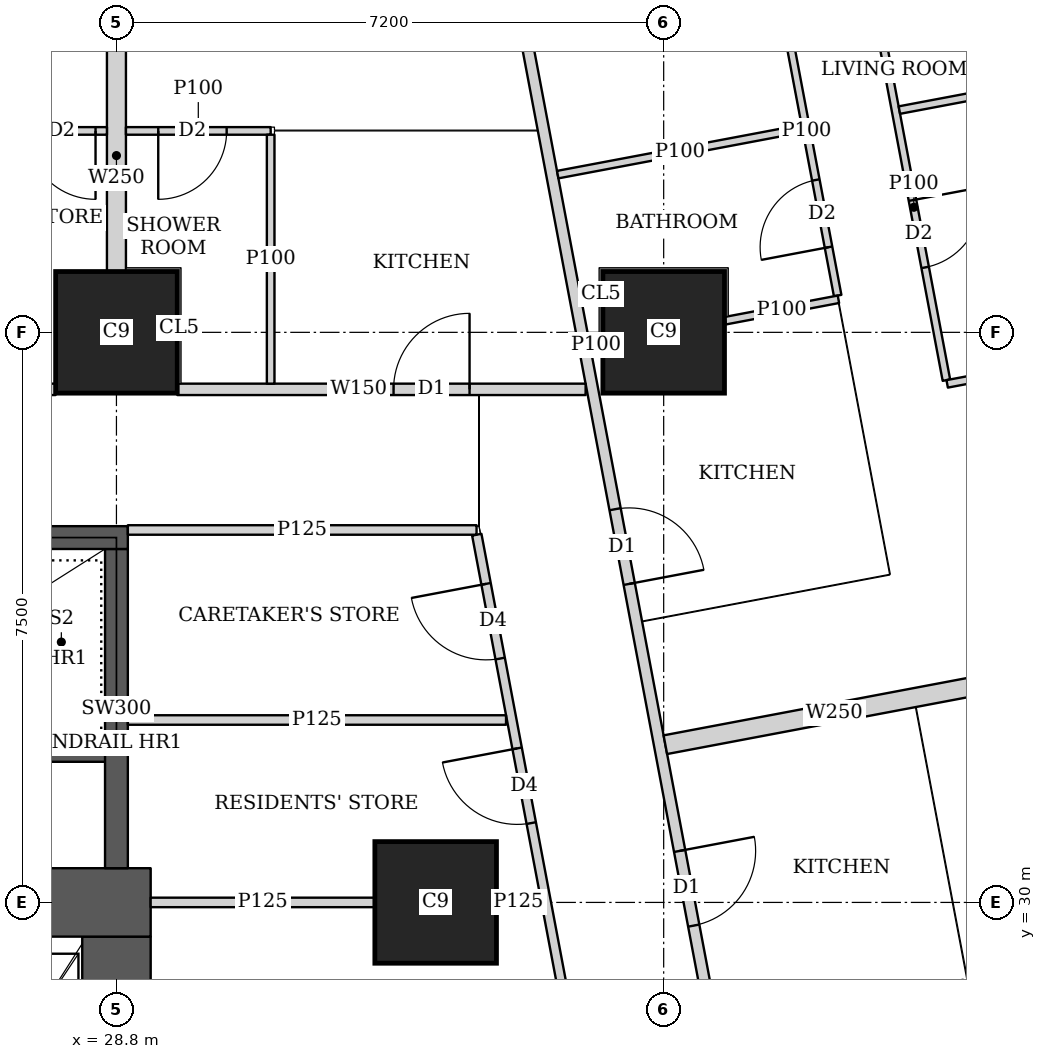
"""IFC4 building model, lengths in metres.
Left out: names, types, materials, properties, quantities, classifications, styles, units other than length and angle.
Written with IfcOpenShell. Run it as: python <this file> out.ifc"""

import sys

from ifc_helpers import new_model, si_unit, direction, frame, frame_2d, origin, origin_2d, place, context, subcontext, project, spatial, rectangle, extrude, element, fill, save


model = new_model("IFC4")
c1 = context("Model", 3, precision=1e-05, world=origin(), true_north=direction((0.0, 1.0)))
c2 = subcontext(c1, "Body", "Model", "MODEL_VIEW")
j1 = project(units=[si_unit("LENGTHUNIT", "METRE"), si_unit("PLANEANGLEUNIT", "RADIAN")], contexts=[c1])
p1 = place(None, origin())
s1 = spatial("IfcSite", under=j1, at=p1, CompositionType="ELEMENT")
p2 = place(p1, origin())
s2 = spatial("IfcBuilding", under=s1, at=p2, CompositionType="ELEMENT")
p3 = place(p2, frame((0.0, 0.0, 126.65)))
s3 = spatial("IfcBuildingStorey", under=s2, at=p3, CompositionType="ELEMENT", Elevation=126.65)
for number, where, z_axis, x_axis in (
    (1, (33.0, 30.0, 0.0), (0.0, 0.0, 1.0), (1.0, 0.0, 0.0)),
    (2, (28.8, 37.5, 0.0), (0.0, 0.0, 1.0), (1.0, 0.0, 0.0)),
    (3, (36.0, 37.5, 0.0), (0.0, 0.0, 1.0), (1.0, 0.0, 0.0)),
):
    element("IfcColumn", number, at=place(p3, frame(where, z_axis=z_axis, x_axis=x_axis)), inside=s3, PredefinedType="COLUMN", context=c2, shape_type="SweptSolid", body=[
        extrude(rectangle(XDim=1.6, YDim=1.6, at=origin_2d()), origin(), (0.0, 0.0, 1.0), 3.75),
    ])
p4 = place(p3, frame((13.95, 30.0, 0.0), z_axis=(0.0, 0.0, 1.0), x_axis=(1.0, 0.0, 0.0)))
e4 = element("IfcWall", 4, at=p4, inside=s3, PredefinedType="SHEAR", context=c2, shape_type="SweptSolid", body=[
    extrude(rectangle(XDim=15.3, YDim=0.9, at=frame_2d((7.65, 0.0))), origin(), (0.0, 0.0, 1.0), 3.75),
])
p5 = place(p4, frame((4.45, 0.0, 0.0)))
e5 = element("IfcOpeningElement", 5, at=p5, cuts=e4, PredefinedType="OPENING", context=c2, shape_type="SweptSolid", body=[
    extrude(rectangle(XDim=1.8, YDim=2.1, at=frame_2d((0.9, 1.05))), frame((0.0, 0.46, 0.0), z_axis=(0.0, -1.0, 0.0), x_axis=(1.0, 0.0, 0.0)), (0.0, 0.0, 1.0), 0.92),
])
p6 = place(p4, frame((10.7, 0.0, 0.0)))
e6 = element("IfcOpeningElement", 6, at=p6, cuts=e4, PredefinedType="OPENING", context=c2, shape_type="SweptSolid", body=[
    extrude(rectangle(XDim=1.1, YDim=2.1, at=frame_2d((0.55, 1.05))), frame((0.0, 0.46, 0.0), z_axis=(0.0, -1.0, 0.0), x_axis=(1.0, 0.0, 0.0)), (0.0, 0.0, 1.0), 0.92),
])
p7 = place(p3, frame((28.8, 15.45, 0.0), z_axis=(0.0, 0.0, 1.0), x_axis=(0.0, 1.0, 0.0)))
e7 = element("IfcWall", 7, at=p7, inside=s3, PredefinedType="SHEAR", context=c2, shape_type="SweptSolid", body=[
    extrude(rectangle(XDim=14.1, YDim=0.9, at=frame_2d((7.05, 0.0))), origin(), (0.0, 0.0, 1.0), 3.75),
])
p8 = place(p3, frame((21.45, 34.8, 0.0), z_axis=(0.0, 0.0, 1.0), x_axis=(1.0, 0.0, 0.0)))
e8 = element("IfcWall", 8, at=p8, inside=s3, PredefinedType="SHEAR", context=c2, shape_type="SweptSolid", body=[
    extrude(rectangle(XDim=7.5, YDim=0.3, at=frame_2d((3.75, 0.0))), origin(), (0.0, 0.0, 1.0), 3.75),
])
p9 = place(p8, frame((0.5, 0.0, 0.0)))
e9 = element("IfcOpeningElement", 9, at=p9, cuts=e8, PredefinedType="OPENING", context=c2, shape_type="SweptSolid", body=[
    extrude(rectangle(XDim=1.1, YDim=2.1, at=frame_2d((0.55, 1.05))), frame((0.0, 0.16, 0.0), z_axis=(0.0, -1.0, 0.0), x_axis=(1.0, 0.0, 0.0)), (0.0, 0.0, 1.0), 0.32),
])
p10 = place(p3, frame((28.8, 30.45, 0.0), z_axis=(0.0, 0.0, 1.0), x_axis=(0.0, 1.0, 0.0)))
e10 = element("IfcWall", 10, at=p10, inside=s3, PredefinedType="SHEAR", context=c2, shape_type="SweptSolid", body=[
    extrude(rectangle(XDim=4.2, YDim=0.3, at=frame_2d((2.1, 0.0))), origin(), (0.0, 0.0, 1.0), 3.75),
])
p11 = place(p3, frame((22.401, 36.75, 0.0), z_axis=(0.0, 0.0, 1.0), x_axis=(1.0, 0.0, 0.0)))
e11 = element("IfcWall", 11, at=p11, inside=s3, PredefinedType="SOLIDWALL", context=c2, shape_type="SweptSolid", body=[
    extrude(rectangle(XDim=5.598, YDim=0.15, at=frame_2d((2.799, 0.0))), origin(), (0.0, 0.0, 1.0), 3.45),
])
p12 = place(p11, frame((0.699, 0.0, 0.0)))
e12 = element("IfcOpeningElement", 12, at=p12, cuts=e11, PredefinedType="OPENING", context=c2, shape_type="SweptSolid", body=[
    extrude(rectangle(XDim=1.0, YDim=2.1, at=frame_2d((0.5, 1.05))), frame((0.0, 0.085, 0.0), z_axis=(0.0, -1.0, 0.0), x_axis=(1.0, 0.0, 0.0)), (0.0, 0.0, 1.0), 0.17),
])
p13 = place(p3, frame((29.601, 36.75, 0.0), z_axis=(0.0, 0.0, 1.0), x_axis=(1.0, 0.0, 0.0)))
e13 = element("IfcWall", 13, at=p13, inside=s3, PredefinedType="SOLIDWALL", context=c2, shape_type="SweptSolid", body=[
    extrude(rectangle(XDim=5.372, YDim=0.15, at=frame_2d((2.686, 0.0))), origin(), (0.0, 0.0, 1.0), 3.45),
])
p14 = place(p13, frame((2.845, 0.0, 0.0)))
e14 = element("IfcOpeningElement", 14, at=p14, cuts=e13, PredefinedType="OPENING", context=c2, shape_type="SweptSolid", body=[
    extrude(rectangle(XDim=1.0, YDim=2.1, at=frame_2d((0.5, 1.05))), frame((0.0, 0.085, 0.0), z_axis=(0.0, -1.0, 0.0), x_axis=(1.0, 0.0, 0.0)), (0.0, 0.0, 1.0), 0.17),
])
p15 = place(p3, frame((33.896, 42.929, 0.0), z_axis=(0.0, 0.0, 1.0), x_axis=(0.1855961604, -0.982626106535, 0.0)))
e15 = element("IfcWall", 15, at=p15, inside=s3, PredefinedType="SOLIDWALL", context=c2, shape_type="SweptSolid", body=[
    extrude(rectangle(XDim=41.456, YDim=0.15, at=frame_2d((20.728, 0.0))), origin(), (0.0, 0.0, 1.0), 2.45),
])
p16 = place(p15, frame((7.893, 0.0, 0.0)))
e16 = element("IfcOpeningElement", 16, at=p16, cuts=e15, PredefinedType="OPENING", context=c2, shape_type="SweptSolid", body=[
    extrude(rectangle(XDim=1.0, YDim=2.1, at=frame_2d((0.5, 1.05))), frame((0.0, 0.085, 0.0), z_axis=(0.0, -1.0, 0.0), x_axis=(1.0, 0.0, 0.0)), (0.0, 0.0, 1.0), 0.17),
])
p17 = place(p15, frame((12.468, 0.0, 0.0)))
e17 = element("IfcOpeningElement", 17, at=p17, cuts=e15, PredefinedType="OPENING", context=c2, shape_type="SweptSolid", body=[
    extrude(rectangle(XDim=1.0, YDim=2.1, at=frame_2d((0.5, 1.05))), frame((0.0, 0.085, 0.0), z_axis=(0.0, -1.0, 0.0), x_axis=(1.0, 0.0, 0.0)), (0.0, 0.0, 1.0), 0.17),
])
p18 = place(p15, frame((20.101, 0.0, 0.0)))
e18 = element("IfcOpeningElement", 18, at=p18, cuts=e15, PredefinedType="OPENING", context=c2, shape_type="SweptSolid", body=[
    extrude(rectangle(XDim=1.0, YDim=2.1, at=frame_2d((0.5, 1.05))), frame((0.0, 0.085, 0.0), z_axis=(0.0, -1.0, 0.0), x_axis=(1.0, 0.0, 0.0)), (0.0, 0.0, 1.0), 0.17),
])
p19 = place(p15, frame((31.064, 0.0, 0.0)))
e19 = element("IfcOpeningElement", 19, at=p19, cuts=e15, PredefinedType="OPENING", context=c2, shape_type="SweptSolid", body=[
    extrude(rectangle(XDim=1.0, YDim=2.1, at=frame_2d((0.5, 1.05))), frame((0.0, 0.085, 0.0), z_axis=(0.0, -1.0, 0.0), x_axis=(1.0, 0.0, 0.0)), (0.0, 0.0, 1.0), 0.17),
])
p20 = place(p3, frame((38.862, 41.42, 0.0), z_axis=(0.0, 0.0, 1.0), x_axis=(0.185332907641, -0.982675792592, 0.0)))
e20 = element("IfcWall", 20, at=p20, inside=s3, PredefinedType="PARTITIONING", context=c2, shape_type="SweptSolid", body=[
    extrude(rectangle(XDim=4.629, YDim=0.1, at=frame_2d((2.314, 0.0))), origin(), (0.0, 0.0, 1.0), 3.45),
])
p21 = place(p20, frame((2.22, 0.0, 0.0)))
e21 = element("IfcOpeningElement", 21, at=p21, cuts=e20, PredefinedType="OPENING", context=c2, shape_type="SweptSolid", body=[
    extrude(rectangle(XDim=0.9, YDim=2.1, at=frame_2d((0.45, 1.05))), frame((0.0, 0.06, 0.0), z_axis=(0.0, -1.0, 0.0), x_axis=(1.0, 0.0, 0.0)), (0.0, 0.0, 1.0), 0.12),
])
p22 = place(p3, frame((37.472, 42.309, 0.0), z_axis=(0.0, 0.0, 1.0), x_axis=(0.185641287362, -0.982617581985, 0.0)))
e22 = element("IfcWall", 22, at=p22, inside=s3, PredefinedType="PARTITIONING", context=c2, shape_type="SweptSolid", body=[
    extrude(rectangle(XDim=4.402, YDim=0.1, at=frame_2d((2.201, 0.0))), origin(), (0.0, 0.0, 1.0), 3.45),
])
p23 = place(p22, frame((2.854, 0.0, 0.0)))
e23 = element("IfcOpeningElement", 23, at=p23, cuts=e22, PredefinedType="OPENING", context=c2, shape_type="SweptSolid", body=[
    extrude(rectangle(XDim=0.9, YDim=2.1, at=frame_2d((0.45, 1.05))), frame((0.0, 0.06, 0.0), z_axis=(0.0, -1.0, 0.0), x_axis=(1.0, 0.0, 0.0)), (0.0, 0.0, 1.0), 0.12),
])
p24 = place(p3, frame((43.277, 41.212, 0.0), z_axis=(0.0, 0.0, 1.0), x_axis=(-0.982665405803, -0.185387972203, 0.0)))
e24 = element("IfcWall", 24, at=p24, inside=s3, PredefinedType="PARTITIONING", context=c2, shape_type="SweptSolid", body=[
    extrude(rectangle(XDim=4.25, YDim=0.1, at=frame_2d((2.125, 0.0))), origin(), (0.0, 0.0, 1.0), 2.0),
])
p25 = place(p3, frame((40.954, 37.053, 0.0), z_axis=(0.0, 0.0, 1.0), x_axis=(-0.982663001154, -0.185400717808, 0.0)))
e25 = element("IfcWall", 25, at=p25, inside=s3, PredefinedType="PARTITIONING", context=c2, shape_type="SweptSolid", body=[
    extrude(rectangle(XDim=1.246, YDim=0.1, at=frame_2d((0.623, 0.0))), origin(), (0.0, 0.0, 1.0), 2.0),
])
p26 = place(p3, frame((37.823, 40.182, 0.0), z_axis=(0.0, 0.0, 1.0), x_axis=(-0.982664729897, -0.18539155487, 0.0)))
e26 = element("IfcWall", 26, at=p26, inside=s3, PredefinedType="PARTITIONING", context=c2, shape_type="SweptSolid", body=[
    extrude(rectangle(XDim=3.274, YDim=0.1, at=frame_2d((1.637, 0.0))), origin(), (0.0, 0.0, 1.0), 3.45),
])
p27 = place(p3, frame((38.299, 37.935, 0.0), z_axis=(0.0, 0.0, 1.0), x_axis=(-0.982536828695, -0.186068213993, 0.0)))
e27 = element("IfcWall", 27, at=p27, inside=s3, PredefinedType="PARTITIONING", context=c2, shape_type="SweptSolid", body=[
    extrude(rectangle(XDim=1.515, YDim=0.1, at=frame_2d((0.758, 0.0))), origin(), (0.0, 0.0, 1.0), 3.45),
])
p28 = place(p3, frame((35.19, 37.347, 0.0), z_axis=(0.0, 0.0, 1.0), x_axis=(-0.982404955251, -0.186763229514, 0.0)))
e28 = element("IfcWall", 28, at=p28, inside=s3, PredefinedType="PARTITIONING", context=c2, shape_type="SweptSolid", body=[
    extrude(rectangle(XDim=0.161, YDim=0.1, at=frame_2d((0.081, 0.0))), origin(), (0.0, 0.0, 1.0), 3.45),
])
p29 = place(p3, frame((40.468, 32.915, 0.0), z_axis=(0.0, 0.0, 1.0), x_axis=(-0.982612837616, -0.185666398014, 0.0)))
e29 = element("IfcWall", 29, at=p29, inside=s3, PredefinedType="SOLIDWALL", context=c2, shape_type="SweptSolid", body=[
    extrude(rectangle(XDim=4.525, YDim=0.25, at=frame_2d((2.262, 0.0))), origin(), (0.0, 0.0, 1.0), 3.45),
])
p30 = place(p3, frame((25.2, 40.15, 0.0), z_axis=(0.0, 0.0, 1.0), x_axis=(1.0, 0.0, 0.0)))
e30 = element("IfcWall", 30, at=p30, inside=s3, PredefinedType="PARTITIONING", context=c2, shape_type="SweptSolid", body=[
    extrude(rectangle(XDim=3.475, YDim=0.1, at=frame_2d((1.738, 0.0))), origin(), (0.0, 0.0, 1.0), 3.45),
])
p31 = place(p30, frame((0.655, 0.0, 0.0)))
e31 = element("IfcOpeningElement", 31, at=p31, cuts=e30, PredefinedType="OPENING", context=c2, shape_type="SweptSolid", body=[
    extrude(rectangle(XDim=0.9, YDim=2.1, at=frame_2d((0.45, 1.05))), frame((0.0, 0.06, 0.0), z_axis=(0.0, -1.0, 0.0), x_axis=(1.0, 0.0, 0.0)), (0.0, 0.0, 1.0), 0.12),
])
p32 = place(p30, frame((2.425, 0.0, 0.0)))
e32 = element("IfcOpeningElement", 32, at=p32, cuts=e30, PredefinedType="OPENING", context=c2, shape_type="SweptSolid", body=[
    extrude(rectangle(XDim=0.9, YDim=2.1, at=frame_2d((0.45, 1.05))), frame((0.0, 0.06, 0.0), z_axis=(0.0, -1.0, 0.0), x_axis=(1.0, 0.0, 0.0)), (0.0, 0.0, 1.0), 0.12),
])
p33 = place(p3, frame((28.925, 40.15, 0.0), z_axis=(0.0, 0.0, 1.0), x_axis=(1.0, 0.0, 0.0)))
e33 = element("IfcWall", 33, at=p33, inside=s3, PredefinedType="PARTITIONING", context=c2, shape_type="SweptSolid", body=[
    extrude(rectangle(XDim=1.904, YDim=0.1, at=frame_2d((0.952, 0.0))), origin(), (0.0, 0.0, 1.0), 3.45),
])
p34 = place(p33, frame((0.425, 0.0, 0.0)))
e34 = element("IfcOpeningElement", 34, at=p34, cuts=e33, PredefinedType="OPENING", context=c2, shape_type="SweptSolid", body=[
    extrude(rectangle(XDim=0.9, YDim=2.1, at=frame_2d((0.45, 1.05))), frame((0.0, 0.06, 0.0), z_axis=(0.0, -1.0, 0.0), x_axis=(1.0, 0.0, 0.0)), (0.0, 0.0, 1.0), 0.12),
])
p35 = place(p3, frame((30.829, 36.825, 0.0), z_axis=(0.0, 0.0, 1.0), x_axis=(0.0, 1.0, 0.0)))
e35 = element("IfcWall", 35, at=p35, inside=s3, PredefinedType="PARTITIONING", context=c2, shape_type="SweptSolid", body=[
    extrude(rectangle(XDim=3.275, YDim=0.1, at=frame_2d((1.638, 0.0))), origin(), (0.0, 0.0, 1.0), 3.45),
])
p36 = place(p3, frame((28.8, 38.301, 0.0), z_axis=(0.0, 0.0, 1.0), x_axis=(0.0, 1.0, 0.0)))
e36 = element("IfcWall", 36, at=p36, inside=s3, PredefinedType="SOLIDWALL", context=c2, shape_type="SweptSolid", body=[
    extrude(rectangle(XDim=3.049, YDim=0.25, at=frame_2d((1.524, 0.0))), origin(), (0.0, 0.0, 1.0), 3.45),
])
p37 = place(p3, frame((28.95, 34.9, 0.0), z_axis=(0.0, 0.0, 1.0), x_axis=(1.0, 0.0, 0.0)))
e37 = element("IfcWall", 37, at=p37, inside=s3, PredefinedType="PARTITIONING", context=c2, shape_type="SweptSolid", body=[
    extrude(rectangle(XDim=4.588, YDim=0.125, at=frame_2d((2.294, 0.0))), origin(), (0.0, 0.0, 1.0), 3.45),
])
p38 = place(p3, frame((38.202, 10.163, 0.0), z_axis=(0.0, 0.0, 1.0), x_axis=(-0.185610321132, 0.982623431783, 0.0)))
e38 = element("IfcWall", 38, at=p38, inside=s3, PredefinedType="PARTITIONING", context=c2, shape_type="SweptSolid", body=[
    extrude(rectangle(XDim=25.111, YDim=0.125, at=frame_2d((12.556, 0.0))), origin(), (0.0, 0.0, 1.0), 2.45),
])
p39 = place(p38, frame((0.708, 0.0, 0.0)))
e39 = element("IfcOpeningElement", 39, at=p39, cuts=e38, PredefinedType="OPENING", context=c2, shape_type="SweptSolid", body=[
    extrude(rectangle(XDim=1.0, YDim=2.1, at=frame_2d((0.5, 1.05))), frame((0.0, 0.073, 0.0), z_axis=(0.0, -1.0, 0.0), x_axis=(1.0, 0.0, 0.0)), (0.0, 0.0, 1.0), 0.145),
])
p40 = place(p38, frame((13.378, 0.0, 0.0)))
e40 = element("IfcOpeningElement", 40, at=p40, cuts=e38, PredefinedType="OPENING", context=c2, shape_type="SweptSolid", body=[
    extrude(rectangle(XDim=1.0, YDim=2.1, at=frame_2d((0.5, 1.05))), frame((0.0, 0.073, 0.0), z_axis=(0.0, -1.0, 0.0), x_axis=(1.0, 0.0, 0.0)), (0.0, 0.0, 1.0), 0.145),
])
p41 = place(p38, frame((21.25, 0.0, 0.0)))
e41 = element("IfcOpeningElement", 41, at=p41, cuts=e38, PredefinedType="OPENING", context=c2, shape_type="SweptSolid", body=[
    extrude(rectangle(XDim=1.0, YDim=2.1, at=frame_2d((0.5, 1.05))), frame((0.0, 0.073, 0.0), z_axis=(0.0, -1.0, 0.0), x_axis=(1.0, 0.0, 0.0)), (0.0, 0.0, 1.0), 0.145),
])
p42 = place(p38, frame((23.453, 0.0, 0.0)))
e42 = element("IfcOpeningElement", 42, at=p42, cuts=e38, PredefinedType="OPENING", context=c2, shape_type="SweptSolid", body=[
    extrude(rectangle(XDim=1.0, YDim=2.1, at=frame_2d((0.5, 1.05))), frame((0.0, 0.073, 0.0), z_axis=(0.0, -1.0, 0.0), x_axis=(1.0, 0.0, 0.0)), (0.0, 0.0, 1.0), 0.145),
])
p43 = place(p3, frame((29.25, 30.0, 0.0), z_axis=(0.0, 0.0, 1.0), x_axis=(1.0, 0.0, 0.0)))
e43 = element("IfcWall", 43, at=p43, inside=s3, PredefinedType="PARTITIONING", context=c2, shape_type="SweptSolid", body=[
    extrude(rectangle(XDim=2.949, YDim=0.125, at=frame_2d((1.475, 0.0))), origin(), (0.0, 0.0, 1.0), 3.45),
])
p44 = place(p3, frame((33.801, 30.0, 0.0), z_axis=(0.0, 0.0, 1.0), x_axis=(1.0, 0.0, 0.0)))
e44 = element("IfcWall", 44, at=p44, inside=s3, PredefinedType="PARTITIONING", context=c2, shape_type="SweptSolid", body=[
    extrude(rectangle(XDim=0.578, YDim=0.125, at=frame_2d((0.289, 0.0))), origin(), (0.0, 0.0, 1.0), 2.45),
])
p45 = place(p3, frame((28.95, 32.4, 0.0), z_axis=(0.0, 0.0, 1.0), x_axis=(1.0, 0.0, 0.0)))
e45 = element("IfcWall", 45, at=p45, inside=s3, PredefinedType="PARTITIONING", context=c2, shape_type="SweptSolid", body=[
    extrude(rectangle(XDim=4.976, YDim=0.125, at=frame_2d((2.488, 0.0))), origin(), (0.0, 0.0, 1.0), 3.45),
])
p46 = place(p3, frame((23.0, 31.95, 0.0), z_axis=(0.0, 0.0, 1.0), x_axis=(1.0, 0.0, 0.0)))
e46 = element("IfcWall", 46, at=p46, inside=s3, PredefinedType="SHEAR", context=c2, shape_type="SweptSolid", body=[
    extrude(rectangle(XDim=5.8, YDim=0.2, at=frame_2d((2.9, 0.0))), origin(), (0.0, 0.0, 1.0), 3.75),
])
p47 = place(p21, origin())
e47 = element("IfcDoor", 47, at=p47, inside=s3, OperationType="SINGLE_SWING_LEFT", PredefinedType="DOOR", context=c2, shape_type="SweptSolid", body=[
    extrude(rectangle(XDim=0.9, YDim=2.1, at=frame_2d((0.45, 1.05))), frame((0.0, 0.025, 0.0), z_axis=(0.0, -1.0, 0.0), x_axis=(1.0, 0.0, 0.0)), (0.0, 0.0, 1.0), 0.05),
])
fill(e21, e47)
p48 = place(p23, origin())
e48 = element("IfcDoor", 48, at=p48, inside=s3, OperationType="SINGLE_SWING_LEFT", PredefinedType="DOOR", context=c2, shape_type="SweptSolid", body=[
    extrude(rectangle(XDim=0.9, YDim=2.1, at=frame_2d((0.45, 1.05))), frame((0.0, 0.025, 0.0), z_axis=(0.0, -1.0, 0.0), x_axis=(1.0, 0.0, 0.0)), (0.0, 0.0, 1.0), 0.05),
])
fill(e23, e48)
p49 = place(p16, origin())
e49 = element("IfcDoor", 49, at=p49, inside=s3, OperationType="SINGLE_SWING_RIGHT", PredefinedType="DOOR", context=c2, shape_type="SweptSolid", body=[
    extrude(rectangle(XDim=1.0, YDim=2.1, at=frame_2d((0.5, 1.05))), frame((0.0, 0.025, 0.0), z_axis=(0.0, -1.0, 0.0), x_axis=(1.0, 0.0, 0.0)), (0.0, 0.0, 1.0), 0.05),
])
fill(e16, e49)
p50 = place(p17, origin())
e50 = element("IfcDoor", 50, at=p50, inside=s3, OperationType="SINGLE_SWING_LEFT", PredefinedType="DOOR", context=c2, shape_type="SweptSolid", body=[
    extrude(rectangle(XDim=1.0, YDim=2.1, at=frame_2d((0.5, 1.05))), frame((0.0, 0.025, 0.0), z_axis=(0.0, -1.0, 0.0), x_axis=(1.0, 0.0, 0.0)), (0.0, 0.0, 1.0), 0.05),
])
fill(e17, e50)
p51 = place(p32, origin())
e51 = element("IfcDoor", 51, at=p51, inside=s3, OperationType="SINGLE_SWING_LEFT", PredefinedType="DOOR", context=c2, shape_type="SweptSolid", body=[
    extrude(rectangle(XDim=0.9, YDim=2.1, at=frame_2d((0.45, 1.05))), frame((0.0, 0.025, 0.0), z_axis=(0.0, -1.0, 0.0), x_axis=(1.0, 0.0, 0.0)), (0.0, 0.0, 1.0), 0.05),
])
fill(e32, e51)
p52 = place(p34, origin())
e52 = element("IfcDoor", 52, at=p52, inside=s3, OperationType="SINGLE_SWING_RIGHT", PredefinedType="DOOR", context=c2, shape_type="SweptSolid", body=[
    extrude(rectangle(XDim=0.9, YDim=2.1, at=frame_2d((0.45, 1.05))), frame((0.0, 0.025, 0.0), z_axis=(0.0, -1.0, 0.0), x_axis=(1.0, 0.0, 0.0)), (0.0, 0.0, 1.0), 0.05),
])
fill(e34, e52)
p53 = place(p14, origin())
e53 = element("IfcDoor", 53, at=p53, inside=s3, OperationType="SINGLE_SWING_RIGHT", PredefinedType="DOOR", context=c2, shape_type="SweptSolid", body=[
    extrude(rectangle(XDim=1.0, YDim=2.1, at=frame_2d((0.5, 1.05))), frame((0.0, 0.025, 0.0), z_axis=(0.0, -1.0, 0.0), x_axis=(1.0, 0.0, 0.0)), (0.0, 0.0, 1.0), 0.05),
])
fill(e14, e53)
p54 = place(p41, origin())
e54 = element("IfcDoor", 54, at=p54, inside=s3, OperationType="SINGLE_SWING_RIGHT", PredefinedType="DOOR", context=c2, shape_type="SweptSolid", body=[
    extrude(rectangle(XDim=1.0, YDim=2.1, at=frame_2d((0.5, 1.05))), frame((0.0, 0.025, 0.0), z_axis=(0.0, -1.0, 0.0), x_axis=(1.0, 0.0, 0.0)), (0.0, 0.0, 1.0), 0.05),
])
fill(e41, e54)
p55 = place(p42, origin())
e55 = element("IfcDoor", 55, at=p55, inside=s3, OperationType="SINGLE_SWING_RIGHT", PredefinedType="DOOR", context=c2, shape_type="SweptSolid", body=[
    extrude(rectangle(XDim=1.0, YDim=2.1, at=frame_2d((0.5, 1.05))), frame((0.0, 0.025, 0.0), z_axis=(0.0, -1.0, 0.0), x_axis=(1.0, 0.0, 0.0)), (0.0, 0.0, 1.0), 0.05),
])
fill(e42, e55)
save(model, sys.argv[1])
